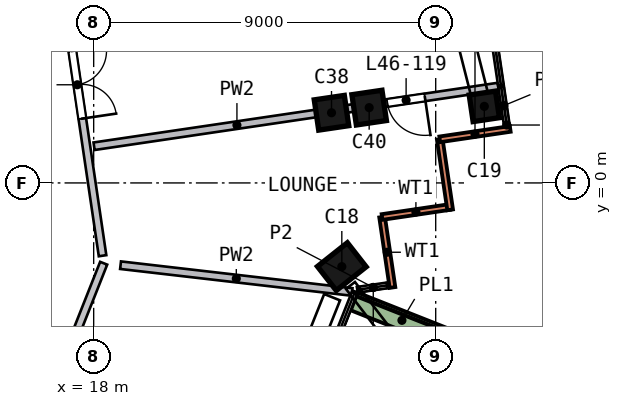
"""IFC4 building model, lengths in metres.
Left out: names, types, materials, properties, quantities, classifications, styles, units other than length and angle.
Written with IfcOpenShell. Run it as: python <this file> out.ifc"""

import sys

from ifc_helpers import new_model, si_unit, direction, frame, frame_2d, origin, origin_2d, place, context, subcontext, project, spatial, rectangle, extrude, element, fill, save


model = new_model("IFC4")
c1 = context("Model", 3, precision=1e-05, world=origin(), true_north=direction((0.0, 1.0)))
c2 = subcontext(c1, "Body", "Model", "MODEL_VIEW")
j1 = project(units=[si_unit("LENGTHUNIT", "METRE"), si_unit("PLANEANGLEUNIT", "RADIAN")], contexts=[c1])
p1 = place(None, origin())
s1 = spatial("IfcSite", under=j1, at=p1, CompositionType="ELEMENT")
p2 = place(p1, origin())
s2 = spatial("IfcBuilding", under=s1, at=p2, CompositionType="ELEMENT")
p3 = place(p2, frame((0.0, 0.0, 190.5)))
s3 = spatial("IfcBuildingStorey", under=s2, at=p3, CompositionType="ELEMENT", Elevation=190.5)
p4 = place(p3, frame((24.517, -2.344, 0.0), z_axis=(0.010109138, 0.116597131, 0.993127844), x_axis=(-0.785151985, -0.614102533, 0.080090196)))
e1 = element("IfcColumn", 1, at=p4, inside=s3, PredefinedType="COLUMN", context=c2, shape_type="SweptSolid", body=[
    extrude(rectangle(XDim=1.0, YDim=0.8, at=origin_2d()), origin(), (0.0, 0.0, 1.0), 3.212),
])
p5 = place(p3, frame((28.291, 1.853, 0.0), z_axis=(-0.009934987, 0.134084399, 0.990920113), x_axis=(-0.146257964, 0.980116709, -0.134088943)))
e2 = element("IfcColumn", 2, at=p5, inside=s3, PredefinedType="COLUMN", context=c2, shape_type="SweptSolid", body=[
    extrude(rectangle(XDim=0.7, YDim=0.7, at=origin_2d()), origin(), (0.0, 0.0, 1.0), 3.219),
])
p6 = place(p3, frame((24.269, 1.707, 0.0), z_axis=(-0.009122481, 0.115323361, 0.993286113), x_axis=(0.989325963, 0.14551005, -0.007808023)))
e3 = element("IfcColumn", 3, at=p6, inside=s3, PredefinedType="COLUMN", context=c2, shape_type="SweptSolid", body=[
    extrude(rectangle(XDim=0.8, YDim=0.8, at=origin_2d()), origin(), (0.0, 0.0, 1.0), 3.211),
])
p7 = place(p3, frame((25.261, 1.837, 0.0), z_axis=(-0.009725198, 0.119969432, 0.992729951), x_axis=(0.989390526, 0.145068742, -0.007838784)))
e4 = element("IfcColumn", 4, at=p7, inside=s3, PredefinedType="COLUMN", context=c2, shape_type="SweptSolid", body=[
    extrude(rectangle(XDim=0.8, YDim=0.8, at=origin_2d()), origin(), (0.0, 0.0, 1.0), 3.213),
])
p8 = place(p3, frame((25.863, -2.751, 0.0), z_axis=(0.0, 0.0, 1.0), x_axis=(-0.146086211, 0.989271863, 0.0)))
e5 = element("IfcWall", 5, at=p8, inside=s3, PredefinedType="SOLIDWALL", context=c2, shape_type="SweptSolid", body=[
    extrude(rectangle(XDim=1.875, YDim=0.15, at=frame_2d((0.938, 0.0))), origin(), (0.0, 0.0, 1.0), 3.19),
])
p9 = place(p3, frame((25.589, -0.896, 0.0), z_axis=(0.0, 0.0, 1.0), x_axis=(0.989271089, 0.146091452, 0.0)))
e6 = element("IfcWall", 6, at=p9, inside=s3, PredefinedType="SOLIDWALL", context=c2, shape_type="SweptSolid", body=[
    extrude(rectangle(XDim=1.8, YDim=0.15, at=frame_2d((0.9, 0.0))), origin(), (0.0, 0.0, 1.0), 3.19),
])
for number, where, z_axis, x_axis in (
    (7, (27.38, -0.708, 0.0), (0.0, 0.0, 1.0), (-0.146, 0.989, 0.0)),
    (8, (27.106, 1.147, 0.0), (0.0, 0.0, 1.0), (0.989, 0.146, 0.0)),
):
    element("IfcWall", number, at=place(p3, frame(where, z_axis=z_axis, x_axis=x_axis)), inside=s3, PredefinedType="SOLIDWALL", context=c2, shape_type="SweptSolid", body=[
        extrude(rectangle(XDim=1.875, YDim=0.15, at=frame_2d((0.938, 0.0))), origin(), (0.0, 0.0, 1.0), 3.19),
    ])
p10 = place(p3, frame((27.366, -4.113, 0.0), z_axis=(0.0, 0.0, 1.0), x_axis=(-0.92976856, 0.36814457, 0.0)))
e9 = element("IfcWall", 9, at=p10, inside=s3, PredefinedType="SOLIDWALL", context=c2, shape_type="SweptSolid", body=[
    extrude(rectangle(XDim=2.699, YDim=0.5, at=frame_2d((1.35, 0.0))), origin(), (0.0, 0.0, 1.0), 0.7),
])
p11 = place(p3, frame((18.263, -2.113, 0.0), z_axis=(0.0, 0.0, 1.0), x_axis=(-0.368126327, -0.929775783, 0.0)))
e10 = element("IfcWall", 10, at=p11, inside=s3, PredefinedType="SOLIDWALL", context=c2, shape_type="SweptSolid", body=[
    extrude(rectangle(XDim=9.317, YDim=0.2, at=frame_2d((4.658, 0.0))), origin(), (0.0, 0.0, 1.0), 3.19),
])
p12 = place(p11, frame((5.15, 0.0, 0.0)))
e11 = element("IfcOpeningElement", 11, at=p12, cuts=e10, PredefinedType="OPENING", context=c2, shape_type="SweptSolid", body=[
    extrude(rectangle(XDim=1.0, YDim=2.1, at=frame_2d((0.5, 1.05))), frame((0.0, 0.11, 0.0), z_axis=(0.0, -1.0, 0.0), x_axis=(1.0, 0.0, 0.0)), (0.0, 0.0, 1.0), 0.22),
])
p13 = place(p3, frame((16.873, 7.302, 0.0), z_axis=(0.0, 0.0, 1.0), x_axis=(0.146064299, -0.989275099, 0.0)))
e12 = element("IfcWall", 12, at=p13, inside=s3, PredefinedType="SOLIDWALL", context=c2, shape_type="SweptSolid", body=[
    extrude(rectangle(XDim=9.317, YDim=0.2, at=frame_2d((4.658, 0.0))), origin(), (0.0, 0.0, 1.0), 3.19),
])
p14 = place(p13, frame((3.869, 0.0, 0.0)))
e13 = element("IfcOpeningElement", 13, at=p14, cuts=e12, PredefinedType="OPENING", context=c2, shape_type="SweptSolid", body=[
    extrude(rectangle(XDim=1.8, YDim=2.1, at=frame_2d((0.9, 1.05))), frame((0.0, 0.11, 0.0), z_axis=(0.0, -1.0, 0.0), x_axis=(1.0, 0.0, 0.0)), (0.0, 0.0, 1.0), 0.22),
])
p15 = place(p3, frame((24.799, -2.869, 0.0), z_axis=(0.0, 0.0, 1.0), x_axis=(-0.993371918, 0.114944478, 0.0)))
e14 = element("IfcWall", 14, at=p15, inside=s3, PredefinedType="SOLIDWALL", context=c2, shape_type="SweptSolid", body=[
    extrude(rectangle(XDim=6.132, YDim=0.2, at=frame_2d((3.066, 0.0))), origin(), (0.0, 0.0, 1.0), 3.19),
])
p16 = place(p3, frame((28.645, 2.536, 0.0), z_axis=(0.0, 0.0, 1.0), x_axis=(-0.989273099, -0.146077839, 0.0)))
e15 = element("IfcWall", 15, at=p16, inside=s3, PredefinedType="SOLIDWALL", context=c2, shape_type="SweptSolid", body=[
    extrude(rectangle(XDim=10.75, YDim=0.2, at=frame_2d((5.375, 0.0))), origin(), (0.0, 0.0, 1.0), 3.19),
])
p17 = place(p16, frame((1.95, 0.0, 0.0)))
e16 = element("IfcOpeningElement", 16, at=p17, cuts=e15, PredefinedType="OPENING", context=c2, shape_type="SweptSolid", body=[
    extrude(rectangle(XDim=1.0, YDim=2.1, at=frame_2d((0.5, 1.05))), frame((0.0, 0.11, 0.0), z_axis=(0.0, -1.0, 0.0), x_axis=(1.0, 0.0, 0.0)), (0.0, 0.0, 1.0), 0.22),
])
p18 = place(p14, origin())
e17 = element("IfcDoor", 17, at=p18, inside=s3, OperationType="DOUBLE_DOOR_SINGLE_SWING", PredefinedType="DOOR", context=c2, shape_type="SweptSolid", body=[
    extrude(rectangle(XDim=1.8, YDim=2.1, at=frame_2d((0.9, 1.05))), frame((0.0, 0.025, 0.0), z_axis=(0.0, -1.0, 0.0), x_axis=(1.0, 0.0, 0.0)), (0.0, 0.0, 1.0), 0.05),
])
fill(e13, e17)
p19 = place(p17, origin())
e18 = element("IfcDoor", 18, at=p19, inside=s3, OperationType="SINGLE_SWING_LEFT", PredefinedType="DOOR", context=c2, shape_type="SweptSolid", body=[
    extrude(rectangle(XDim=1.0, YDim=2.1, at=frame_2d((0.5, 1.05))), frame((0.0, 0.025, 0.0), z_axis=(0.0, -1.0, 0.0), x_axis=(1.0, 0.0, 0.0)), (0.0, 0.0, 1.0), 0.05),
])
fill(e16, e18)
save(model, sys.argv[1])
